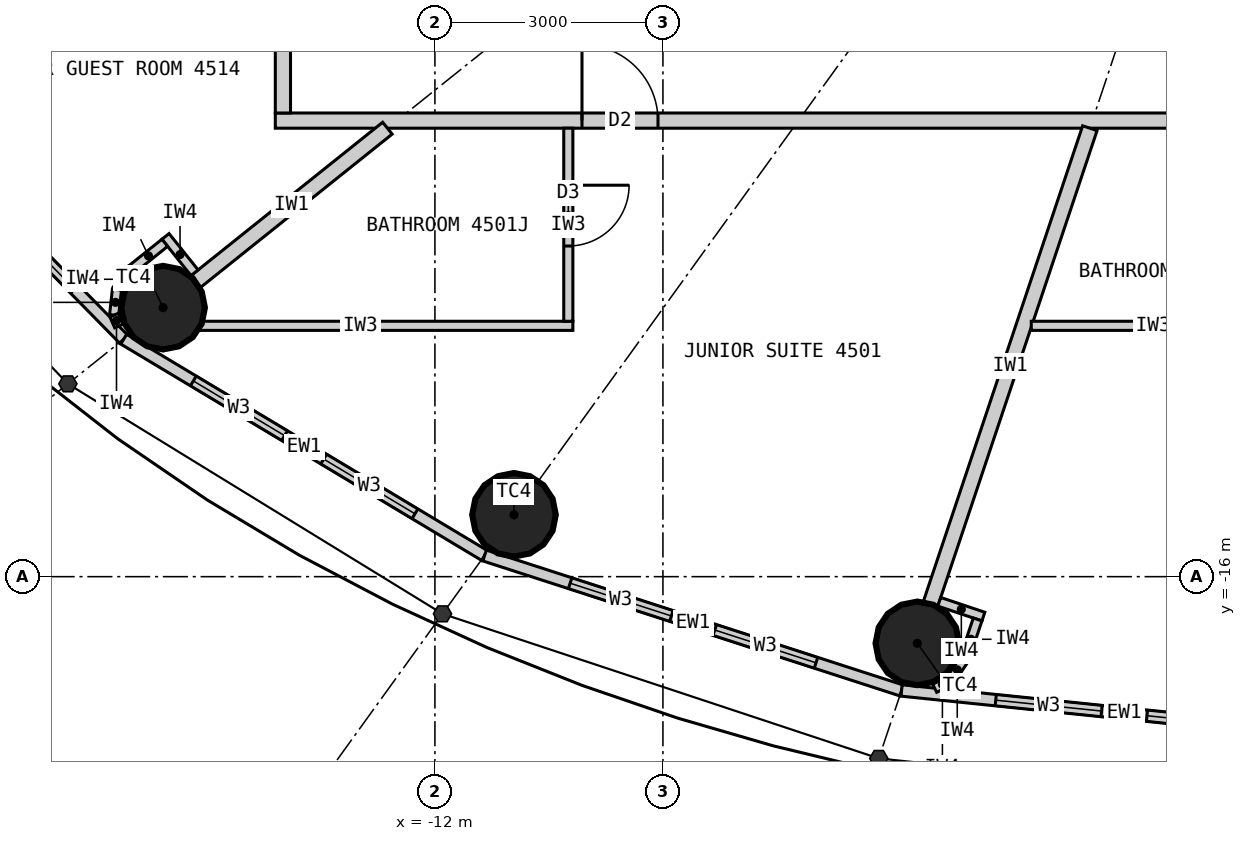
"""IFC4 building model, lengths in metres.
Left out: names, types, materials, properties, quantities, classifications, styles, units other than length and angle.
Written with IfcOpenShell. Run it as: python <this file> out.ifc"""

import sys

from ifc_helpers import new_model, si_unit, direction, frame, frame_2d, origin, origin_2d, place, context, subcontext, project, spatial, rectangle, circle, extrude, element, fill, save


model = new_model("IFC4")
c1 = context("Model", 3, precision=1e-05, world=origin(), true_north=direction((0.0, 1.0)))
c2 = subcontext(c1, "Body", "Model", "MODEL_VIEW")
j1 = project(units=[si_unit("LENGTHUNIT", "METRE"), si_unit("PLANEANGLEUNIT", "RADIAN")], contexts=[c1])
p1 = place(None, origin())
s1 = spatial("IfcSite", under=j1, at=p1, CompositionType="ELEMENT")
p2 = place(p1, origin())
s2 = spatial("IfcBuilding", under=s1, at=p2, CompositionType="ELEMENT")
p3 = place(p2, frame((0.0, 0.0, 169.8)))
s3 = spatial("IfcBuildingStorey", under=s2, at=p3, CompositionType="ELEMENT", Elevation=169.8)
for number, where, z_axis, x_axis in (
    (1, (-15.576, -12.461, 0.0), (0.0, 0.0, 1.0), (1.0, 0.0, 0.0)),
    (2, (-10.96, -15.186, 0.0), (0.0, 0.0, 1.0), (1.0, 0.0, 0.0)),
    (3, (-5.653, -16.877, 0.0), (0.0, 0.0, 1.0), (1.0, 0.0, 0.0)),
):
    element("IfcColumn", number, at=place(p3, frame(where, z_axis=z_axis, x_axis=x_axis)), inside=s3, PredefinedType="COLUMN", context=c2, shape_type="SweptSolid", body=[
        extrude(circle(Radius=0.55, at=origin_2d()), origin(), (0.0, 0.0, 1.0), 3.3),
    ])
p4 = place(p3, frame((-19.772, -9.132, 0.0), z_axis=(0.0, 0.0, 1.0), x_axis=(0.700727467776, -0.71342905457, 0.0)))
e4 = element("IfcWall", 4, at=p4, inside=s3, PredefinedType="ELEMENTEDWALL", context=c2, shape_type="SweptSolid", body=[
    extrude(rectangle(XDim=5.247, YDim=0.15, at=frame_2d((2.624, 0.0))), origin(), (0.0, 0.0, 1.0), 3.12),
])
p5 = place(p4, frame((0.924, 0.0, 0.9)))
e5 = element("IfcOpeningElement", 5, at=p5, cuts=e4, PredefinedType="OPENING", context=c2, shape_type="SweptSolid", body=[
    extrude(rectangle(XDim=1.4, YDim=1.9, at=frame_2d((0.7, 0.95))), frame((0.0, 0.085, 0.0), z_axis=(0.0, -1.0, 0.0), x_axis=(1.0, 0.0, 0.0)), (0.0, 0.0, 1.0), 0.17),
])
p6 = place(p4, frame((2.924, 0.0, 0.9)))
e6 = element("IfcOpeningElement", 6, at=p6, cuts=e4, PredefinedType="OPENING", context=c2, shape_type="SweptSolid", body=[
    extrude(rectangle(XDim=1.4, YDim=1.9, at=frame_2d((0.7, 0.95))), frame((0.0, 0.085, 0.0), z_axis=(0.0, -1.0, 0.0), x_axis=(1.0, 0.0, 0.0)), (0.0, 0.0, 1.0), 0.17),
])
p7 = place(p3, frame((-16.095, -12.876, 0.0), z_axis=(0.0, 0.0, 1.0), x_axis=(0.857695199231, -0.514158482587, 0.0)))
e7 = element("IfcWall", 7, at=p7, inside=s3, PredefinedType="ELEMENTEDWALL", context=c2, shape_type="SweptSolid", body=[
    extrude(rectangle(XDim=5.536, YDim=0.15, at=frame_2d((2.768, 0.0))), origin(), (0.0, 0.0, 1.0), 3.12),
])
p8 = place(p7, frame((1.068, 0.0, 0.9)))
e8 = element("IfcOpeningElement", 8, at=p8, cuts=e7, PredefinedType="OPENING", context=c2, shape_type="SweptSolid", body=[
    extrude(rectangle(XDim=1.4, YDim=1.9, at=frame_2d((0.7, 0.95))), frame((0.0, 0.085, 0.0), z_axis=(0.0, -1.0, 0.0), x_axis=(1.0, 0.0, 0.0)), (0.0, 0.0, 1.0), 0.17),
])
p9 = place(p7, frame((3.068, 0.0, 0.9)))
e9 = element("IfcOpeningElement", 9, at=p9, cuts=e7, PredefinedType="OPENING", context=c2, shape_type="SweptSolid", body=[
    extrude(rectangle(XDim=1.4, YDim=1.9, at=frame_2d((0.7, 0.95))), frame((0.0, 0.085, 0.0), z_axis=(0.0, -1.0, 0.0), x_axis=(1.0, 0.0, 0.0)), (0.0, 0.0, 1.0), 0.17),
])
p10 = place(p3, frame((-11.346, -15.722, 0.0), z_axis=(0.0, 0.0, 1.0), x_axis=(0.951432482129, -0.307857486429, 0.0)))
e10 = element("IfcWall", 10, at=p10, inside=s3, PredefinedType="ELEMENTEDWALL", context=c2, shape_type="SweptSolid", body=[
    extrude(rectangle(XDim=5.766, YDim=0.15, at=frame_2d((2.883, 0.0))), origin(), (0.0, 0.0, 1.0), 3.12),
])
p11 = place(p10, frame((1.183, 0.0, 0.9)))
e11 = element("IfcOpeningElement", 11, at=p11, cuts=e10, PredefinedType="OPENING", context=c2, shape_type="SweptSolid", body=[
    extrude(rectangle(XDim=1.4, YDim=1.9, at=frame_2d((0.7, 0.95))), frame((0.0, 0.085, 0.0), z_axis=(0.0, -1.0, 0.0), x_axis=(1.0, 0.0, 0.0)), (0.0, 0.0, 1.0), 0.17),
])
p12 = place(p10, frame((3.183, 0.0, 0.9)))
e12 = element("IfcOpeningElement", 12, at=p12, cuts=e10, PredefinedType="OPENING", context=c2, shape_type="SweptSolid", body=[
    extrude(rectangle(XDim=1.4, YDim=1.9, at=frame_2d((0.7, 0.95))), frame((0.0, 0.085, 0.0), z_axis=(0.0, -1.0, 0.0), x_axis=(1.0, 0.0, 0.0)), (0.0, 0.0, 1.0), 0.17),
])
p13 = place(p3, frame((-5.86, -17.497, 0.0), z_axis=(0.0, 0.0, 1.0), x_axis=(0.994751738032, -0.102318032045, 0.0)))
e13 = element("IfcWall", 13, at=p13, inside=s3, PredefinedType="ELEMENTEDWALL", context=c2, shape_type="SweptSolid", body=[
    extrude(rectangle(XDim=5.891, YDim=0.15, at=frame_2d((2.946, 0.0))), origin(), (0.0, 0.0, 1.0), 3.12),
])
p14 = place(p13, frame((1.246, 0.0, 0.9)))
e14 = element("IfcOpeningElement", 14, at=p14, cuts=e13, PredefinedType="OPENING", context=c2, shape_type="SweptSolid", body=[
    extrude(rectangle(XDim=1.4, YDim=1.9, at=frame_2d((0.7, 0.95))), frame((0.0, 0.085, 0.0), z_axis=(0.0, -1.0, 0.0), x_axis=(1.0, 0.0, 0.0)), (0.0, 0.0, 1.0), 0.17),
])
p15 = place(p13, frame((3.246, 0.0, 0.9)))
e15 = element("IfcOpeningElement", 15, at=p15, cuts=e13, PredefinedType="OPENING", context=c2, shape_type="SweptSolid", body=[
    extrude(rectangle(XDim=1.4, YDim=1.9, at=frame_2d((0.7, 0.95))), frame((0.0, 0.085, 0.0), z_axis=(0.0, -1.0, 0.0), x_axis=(1.0, 0.0, 0.0)), (0.0, 0.0, 1.0), 0.17),
])
p16 = place(p3, frame((14.1, -10.0, 0.0), z_axis=(0.0, 0.0, 1.0), x_axis=(-1.0, 0.0, 0.0)))
e16 = element("IfcWall", 16, at=p16, inside=s3, PredefinedType="PARTITIONING", context=c2, shape_type="SweptSolid", body=[
    extrude(rectangle(XDim=28.2, YDim=0.2, at=frame_2d((14.1, 0.0))), origin(), (0.0, 0.0, 1.0), 3.12),
])
p17 = place(p16, frame((23.165, 0.0, 0.0)))
e17 = element("IfcOpeningElement", 17, at=p17, cuts=e16, PredefinedType="OPENING", context=c2, shape_type="SweptSolid", body=[
    extrude(rectangle(XDim=1.0, YDim=2.2, at=frame_2d((0.5, 1.1))), frame((0.0, 0.11, 0.0), z_axis=(0.0, -1.0, 0.0), x_axis=(1.0, 0.0, 0.0)), (0.0, 0.0, 1.0), 0.22),
])
p18 = place(p16, frame((13.923, 0.0, 0.0)))
e18 = element("IfcOpeningElement", 18, at=p18, cuts=e16, PredefinedType="OPENING", context=c2, shape_type="SweptSolid", body=[
    extrude(rectangle(XDim=1.0, YDim=2.2, at=frame_2d((0.5, 1.1))), frame((0.0, 0.11, 0.0), z_axis=(0.0, -1.0, 0.0), x_axis=(1.0, 0.0, 0.0)), (0.0, 0.0, 1.0), 0.22),
])
p19 = place(p16, frame((7.957, 0.0, 0.0)))
e19 = element("IfcOpeningElement", 19, at=p19, cuts=e16, PredefinedType="OPENING", context=c2, shape_type="SweptSolid", body=[
    extrude(rectangle(XDim=1.0, YDim=2.2, at=frame_2d((0.5, 1.1))), frame((0.0, 0.11, 0.0), z_axis=(0.0, -1.0, 0.0), x_axis=(1.0, 0.0, 0.0)), (0.0, 0.0, 1.0), 0.22),
])
p20 = place(p3, frame((-12.625, -10.1, 0.0), z_axis=(0.0, 0.0, 1.0), x_axis=(-0.780876185034, -0.624685827954, 0.0)))
e20 = element("IfcWall", 20, at=p20, inside=s3, PredefinedType="PARTITIONING", context=c2, shape_type="SweptSolid", body=[
    extrude(rectangle(XDim=3.229, YDim=0.2, at=frame_2d((1.615, 0.0))), origin(), (0.0, 0.0, 1.0), 2.42),
])
p21 = place(p3, frame((-3.383, -10.1, 0.0), z_axis=(0.0, 0.0, 1.0), x_axis=(-0.317615120474, -0.948219718866, 0.0)))
e21 = element("IfcWall", 21, at=p21, inside=s3, PredefinedType="PARTITIONING", context=c2, shape_type="SweptSolid", body=[
    extrude(rectangle(XDim=6.597, YDim=0.2, at=frame_2d((3.299, 0.0))), origin(), (0.0, 0.0, 1.0), 2.42),
])
p22 = place(p3, frame((-15.775, -12.7, 0.0), z_axis=(0.0, 0.0, 1.0), x_axis=(1.0, 0.0, 0.0)))
e22 = element("IfcWall", 22, at=p22, inside=s3, PredefinedType="PARTITIONING", context=c2, shape_type="SweptSolid", body=[
    extrude(rectangle(XDim=5.59, YDim=0.12, at=frame_2d((2.795, 0.0))), origin(), (0.0, 0.0, 1.0), 3.12),
])
p23 = place(p3, frame((-10.245, -10.1, 0.0), z_axis=(0.0, 0.0, 1.0), x_axis=(0.0, -1.0, 0.0)))
e23 = element("IfcWall", 23, at=p23, inside=s3, PredefinedType="PARTITIONING", context=c2, shape_type="SweptSolid", body=[
    extrude(rectangle(XDim=2.54, YDim=0.12, at=frame_2d((1.27, 0.0))), origin(), (0.0, 0.0, 1.0), 3.12),
])
p24 = place(p23, frame((0.75, 0.0, 0.0)))
e24 = element("IfcOpeningElement", 24, at=p24, cuts=e23, PredefinedType="OPENING", context=c2, shape_type="SweptSolid", body=[
    extrude(rectangle(XDim=0.8, YDim=2.1, at=frame_2d((0.4, 1.05))), frame((0.0, 0.07, 0.0), z_axis=(0.0, -1.0, 0.0), x_axis=(1.0, 0.0, 0.0)), (0.0, 0.0, 1.0), 0.14),
])
p25 = place(p3, frame((-4.154, -12.7, 0.0), z_axis=(0.0, 0.0, 1.0), x_axis=(1.0, 0.0, 0.0)))
e25 = element("IfcWall", 25, at=p25, inside=s3, PredefinedType="PARTITIONING", context=c2, shape_type="SweptSolid", body=[
    extrude(rectangle(XDim=3.211, YDim=0.12, at=frame_2d((1.605, 0.0))), origin(), (0.0, 0.0, 1.0), 3.12),
])
p26 = place(p3, frame((-14.0, -1.67, 0.0), z_axis=(0.0, 0.0, 1.0), x_axis=(0.0, -1.0, 0.0)))
e26 = element("IfcWall", 26, at=p26, inside=s3, PredefinedType="PARTITIONING", context=c2, shape_type="SweptSolid", body=[
    extrude(rectangle(XDim=8.23, YDim=0.2, at=frame_2d((4.115, 0.0))), origin(), (0.0, 0.0, 1.0), 3.12),
])
p27 = place(p26, frame((5.552, 0.0, 0.0)))
e27 = element("IfcOpeningElement", 27, at=p27, cuts=e26, PredefinedType="OPENING", context=c2, shape_type="SweptSolid", body=[
    extrude(rectangle(XDim=1.0, YDim=2.2, at=frame_2d((0.5, 1.1))), frame((0.0, 0.11, 0.0), z_axis=(0.0, -1.0, 0.0), x_axis=(1.0, 0.0, 0.0)), (0.0, 0.0, 1.0), 0.22),
])
p28 = place(p3, frame((-15.162, -12.002, 0.0), z_axis=(0.0, 0.0, 1.0), x_axis=(-0.624597762427, 0.780946627607, 0.0)))
e28 = element("IfcWall", 28, at=p28, inside=s3, PredefinedType="PARTITIONING", context=c2, shape_type="SweptSolid", body=[
    extrude(rectangle(XDim=0.612, YDim=0.12, at=frame_2d((0.306, 0.0))), origin(), (0.0, 0.0, 1.0), 3.12),
])
p29 = place(p3, frame((-15.554, -11.608, 0.0), z_axis=(0.0, 0.0, 1.0), x_axis=(-0.780695577787, -0.624911525597, 0.0)))
e29 = element("IfcWall", 29, at=p29, inside=s3, PredefinedType="PARTITIONING", context=c2, shape_type="SweptSolid", body=[
    extrude(rectangle(XDim=0.55, YDim=0.12, at=frame_2d((0.275, 0.0))), origin(), (0.0, 0.0, 1.0), 3.12),
])
p30 = place(p3, frame((-15.984, -11.952, 0.0), z_axis=(0.0, 0.0, 1.0), x_axis=(-0.592335221171, -0.805691619517, 0.0)))
e30 = element("IfcWall", 30, at=p30, inside=s3, PredefinedType="PARTITIONING", context=c2, shape_type="SweptSolid", body=[
    extrude(rectangle(XDim=0.338, YDim=0.12, at=frame_2d((0.169, 0.0))), origin(), (0.0, 0.0, 1.0), 3.12),
])
p31 = place(p3, frame((-16.184, -12.224, 0.0), z_axis=(0.0, 0.0, 1.0), x_axis=(-0.110669692975, -0.993857242795, 0.0)))
e31 = element("IfcWall", 31, at=p31, inside=s3, PredefinedType="PARTITIONING", context=c2, shape_type="SweptSolid", body=[
    extrude(rectangle(XDim=0.337, YDim=0.12, at=frame_2d((0.169, 0.0))), origin(), (0.0, 0.0, 1.0), 3.12),
])
p32 = place(p3, frame((-16.221, -12.559, 0.0), z_axis=(0.0, 0.0, 1.0), x_axis=(0.401064416249, -0.916049853457, 0.0)))
e32 = element("IfcWall", 32, at=p32, inside=s3, PredefinedType="PARTITIONING", context=c2, shape_type="SweptSolid", body=[
    extrude(rectangle(XDim=0.156, YDim=0.12, at=frame_2d((0.078, 0.0))), origin(), (0.0, 0.0, 1.0), 3.12),
])
p33 = place(p3, frame((-5.364, -16.331, 0.0), z_axis=(0.0, 0.0, 1.0), x_axis=(0.948283770087, -0.317423835572, 0.0)))
e33 = element("IfcWall", 33, at=p33, inside=s3, PredefinedType="PARTITIONING", context=c2, shape_type="SweptSolid", body=[
    extrude(rectangle(XDim=0.612, YDim=0.12, at=frame_2d((0.306, 0.0))), origin(), (0.0, 0.0, 1.0), 3.12),
])
p34 = place(p3, frame((-4.86, -16.563, 0.0), z_axis=(0.0, 0.0, 1.0), x_axis=(-0.317825321803, -0.948149284038, 0.0)))
e34 = element("IfcWall", 34, at=p34, inside=s3, PredefinedType="PARTITIONING", context=c2, shape_type="SweptSolid", body=[
    extrude(rectangle(XDim=0.55, YDim=0.12, at=frame_2d((0.275, 0.0))), origin(), (0.0, 0.0, 1.0), 3.12),
])
p35 = place(p3, frame((-5.034, -17.084, 0.0), z_axis=(0.0, 0.0, 1.0), x_axis=(-0.552362205726, -0.833604218851, 0.0)))
e35 = element("IfcWall", 35, at=p35, inside=s3, PredefinedType="PARTITIONING", context=c2, shape_type="SweptSolid", body=[
    extrude(rectangle(XDim=0.338, YDim=0.12, at=frame_2d((0.169, 0.0))), origin(), (0.0, 0.0, 1.0), 3.12),
])
p36 = place(p3, frame((-5.221, -17.366, 0.0), z_axis=(0.0, 0.0, 1.0), x_axis=(-0.895067896179, -0.445929883759, 0.0)))
e36 = element("IfcWall", 36, at=p36, inside=s3, PredefinedType="PARTITIONING", context=c2, shape_type="SweptSolid", body=[
    extrude(rectangle(XDim=0.228, YDim=0.12, at=frame_2d((0.114, 0.0))), origin(), (0.0, 0.0, 1.0), 3.12),
])
p37 = place(p6, origin())
e37 = element("IfcWindow", 37, at=p37, inside=s3, PartitioningType="SINGLE_PANEL", PredefinedType="WINDOW", context=c2, shape_type="SweptSolid", body=[
    extrude(rectangle(XDim=1.4, YDim=1.9, at=frame_2d((0.7, 0.95))), frame((0.0, 0.03, 0.0), z_axis=(0.0, -1.0, 0.0), x_axis=(1.0, 0.0, 0.0)), (0.0, 0.0, 1.0), 0.06),
])
fill(e6, e37)
p38 = place(p8, origin())
e38 = element("IfcWindow", 38, at=p38, inside=s3, PartitioningType="SINGLE_PANEL", PredefinedType="WINDOW", context=c2, shape_type="SweptSolid", body=[
    extrude(rectangle(XDim=1.4, YDim=1.9, at=frame_2d((0.7, 0.95))), frame((0.0, 0.03, 0.0), z_axis=(0.0, -1.0, 0.0), x_axis=(1.0, 0.0, 0.0)), (0.0, 0.0, 1.0), 0.06),
])
fill(e8, e38)
p39 = place(p9, origin())
e39 = element("IfcWindow", 39, at=p39, inside=s3, PartitioningType="SINGLE_PANEL", PredefinedType="WINDOW", context=c2, shape_type="SweptSolid", body=[
    extrude(rectangle(XDim=1.4, YDim=1.9, at=frame_2d((0.7, 0.95))), frame((0.0, 0.03, 0.0), z_axis=(0.0, -1.0, 0.0), x_axis=(1.0, 0.0, 0.0)), (0.0, 0.0, 1.0), 0.06),
])
fill(e9, e39)
p40 = place(p11, origin())
e40 = element("IfcWindow", 40, at=p40, inside=s3, PartitioningType="SINGLE_PANEL", PredefinedType="WINDOW", context=c2, shape_type="SweptSolid", body=[
    extrude(rectangle(XDim=1.4, YDim=1.9, at=frame_2d((0.7, 0.95))), frame((0.0, 0.03, 0.0), z_axis=(0.0, -1.0, 0.0), x_axis=(1.0, 0.0, 0.0)), (0.0, 0.0, 1.0), 0.06),
])
fill(e11, e40)
p41 = place(p12, origin())
e41 = element("IfcWindow", 41, at=p41, inside=s3, PartitioningType="SINGLE_PANEL", PredefinedType="WINDOW", context=c2, shape_type="SweptSolid", body=[
    extrude(rectangle(XDim=1.4, YDim=1.9, at=frame_2d((0.7, 0.95))), frame((0.0, 0.03, 0.0), z_axis=(0.0, -1.0, 0.0), x_axis=(1.0, 0.0, 0.0)), (0.0, 0.0, 1.0), 0.06),
])
fill(e12, e41)
p42 = place(p14, origin())
e42 = element("IfcWindow", 42, at=p42, inside=s3, PartitioningType="SINGLE_PANEL", PredefinedType="WINDOW", context=c2, shape_type="SweptSolid", body=[
    extrude(rectangle(XDim=1.4, YDim=1.9, at=frame_2d((0.7, 0.95))), frame((0.0, 0.03, 0.0), z_axis=(0.0, -1.0, 0.0), x_axis=(1.0, 0.0, 0.0)), (0.0, 0.0, 1.0), 0.06),
])
fill(e14, e42)
p43 = place(p15, origin())
e43 = element("IfcWindow", 43, at=p43, inside=s3, PartitioningType="SINGLE_PANEL", PredefinedType="WINDOW", context=c2, shape_type="SweptSolid", body=[
    extrude(rectangle(XDim=1.4, YDim=1.9, at=frame_2d((0.7, 0.95))), frame((0.0, 0.03, 0.0), z_axis=(0.0, -1.0, 0.0), x_axis=(1.0, 0.0, 0.0)), (0.0, 0.0, 1.0), 0.06),
])
fill(e15, e43)
p44 = place(p24, origin())
e44 = element("IfcDoor", 44, at=p44, inside=s3, OperationType="SINGLE_SWING_LEFT", PredefinedType="DOOR", context=c2, shape_type="SweptSolid", body=[
    extrude(rectangle(XDim=0.8, YDim=2.1, at=frame_2d((0.4, 1.05))), frame((0.0, 0.025, 0.0), z_axis=(0.0, -1.0, 0.0), x_axis=(1.0, 0.0, 0.0)), (0.0, 0.0, 1.0), 0.05),
])
fill(e24, e44)
p45 = place(p17, origin())
e45 = element("IfcDoor", 45, at=p45, inside=s3, OperationType="SINGLE_SWING_RIGHT", PredefinedType="DOOR", context=c2, shape_type="SweptSolid", body=[
    extrude(rectangle(XDim=1.0, YDim=2.2, at=frame_2d((0.5, 1.1))), frame((0.0, 0.025, 0.0), z_axis=(0.0, -1.0, 0.0), x_axis=(1.0, 0.0, 0.0)), (0.0, 0.0, 1.0), 0.05),
])
fill(e17, e45)
save(model, sys.argv[1])
